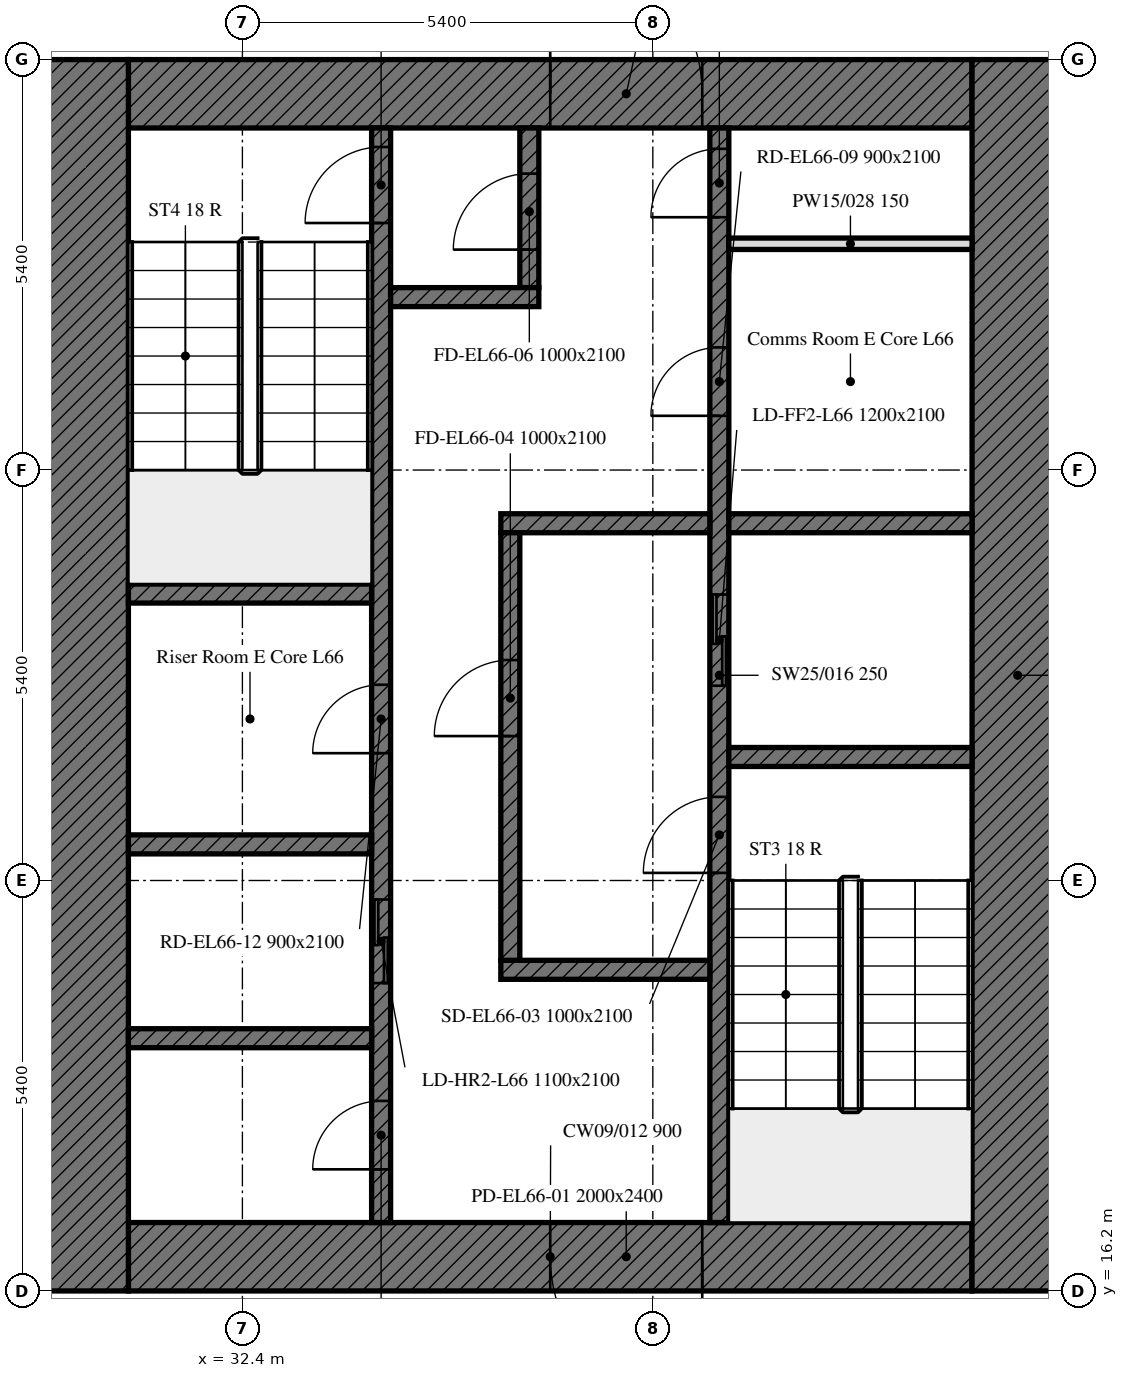
"""IFC4 building model, lengths in metres.
Left out: names, types, materials, properties, quantities, classifications, styles, units other than length and angle.
Written with IfcOpenShell. Run it as: python <this file> out.ifc"""

import sys

from ifc_helpers import new_model, si_unit, direction, frame, frame_2d, origin, place, context, subcontext, project, spatial, rectangle, extrude, element, fill, save


model = new_model("IFC4")
c1 = context("Model", 3, precision=1e-05, world=origin(), true_north=direction((0.0, 1.0)))
c2 = subcontext(c1, "Body", "Model", "MODEL_VIEW")
j1 = project(units=[si_unit("LENGTHUNIT", "METRE"), si_unit("PLANEANGLEUNIT", "RADIAN")], contexts=[c1])
p1 = place(None, origin())
s1 = spatial("IfcSite", under=j1, at=p1, CompositionType="ELEMENT")
p2 = place(p1, origin())
s2 = spatial("IfcBuilding", under=s1, at=p2, CompositionType="ELEMENT")
p3 = place(p2, frame((0.0, 0.0, 271.9)))
s3 = spatial("IfcBuildingStorey", under=s2, at=p3, CompositionType="ELEMENT", Elevation=271.9)
p4 = place(p3, frame((42.0, 16.65, 0.0), z_axis=(0.0, 0.0, 1.0), x_axis=(-1.0, 0.0, 0.0)))
e1 = element("IfcWall", 1, at=p4, inside=s3, PredefinedType="SOLIDWALL", context=c2, shape_type="SweptSolid", body=[
    extrude(rectangle(XDim=11.1, YDim=0.9, at=frame_2d((5.55, 0.0))), origin(), (0.0, 0.0, 1.0), 3.0),
])
p5 = place(p4, frame((3.55, 0.0, 0.0)))
e2 = element("IfcOpeningElement", 2, at=p5, cuts=e1, PredefinedType="OPENING", context=c2, shape_type="SweptSolid", body=[
    extrude(rectangle(XDim=2.0, YDim=2.4, at=frame_2d((1.0, 1.2))), frame((0.0, 0.45, 0.0), z_axis=(0.0, -1.0, 0.0), x_axis=(1.0, 0.0, 0.0)), (0.0, 0.0, 1.0), 0.9),
])
p6 = place(p3, frame((30.9, 31.95, 0.0), z_axis=(0.0, 0.0, 1.0), x_axis=(1.0, 0.0, 0.0)))
e3 = element("IfcWall", 3, at=p6, inside=s3, PredefinedType="SOLIDWALL", context=c2, shape_type="SweptSolid", body=[
    extrude(rectangle(XDim=11.1, YDim=0.9, at=frame_2d((5.55, 0.0))), origin(), (0.0, 0.0, 1.0), 3.0),
])
p7 = place(p6, frame((5.55, 0.0, 0.0)))
e4 = element("IfcOpeningElement", 4, at=p7, cuts=e3, PredefinedType="OPENING", context=c2, shape_type="SweptSolid", body=[
    extrude(rectangle(XDim=2.0, YDim=2.4, at=frame_2d((1.0, 1.2))), frame((0.0, 0.45, 0.0), z_axis=(0.0, -1.0, 0.0), x_axis=(1.0, 0.0, 0.0)), (0.0, 0.0, 1.0), 0.9),
])
for number, where, z_axis, x_axis in (
    (5, (42.6, 32.4, 0.0), (0.0, 0.0, 1.0), (0.0, -1.0, 0.0)),
    (6, (30.3, 16.2, 0.0), (0.0, 0.0, 1.0), (0.0, 1.0, 0.0)),
):
    element("IfcWall", number, at=place(p3, frame(where, z_axis=z_axis, x_axis=x_axis)), inside=s3, PredefinedType="SOLIDWALL", context=c2, shape_type="SweptSolid", body=[
        extrude(rectangle(XDim=16.2, YDim=1.2, at=frame_2d((8.1, 0.0))), origin(), (0.0, 0.0, 1.0), 3.0),
    ])
p8 = place(p3, frame((38.675, 17.1, 0.0), z_axis=(0.0, 0.0, 1.0), x_axis=(0.0, 1.0, 0.0)))
e7 = element("IfcWall", 7, at=p8, inside=s3, PredefinedType="SOLIDWALL", context=c2, shape_type="SweptSolid", body=[
    extrude(rectangle(XDim=14.4, YDim=0.25, at=frame_2d((7.2, 0.0))), origin(), (0.0, 0.0, 1.0), 3.0),
])
p9 = place(p8, frame((4.6, 0.0, 0.0)))
e8 = element("IfcOpeningElement", 8, at=p9, cuts=e7, PredefinedType="OPENING", context=c2, shape_type="SweptSolid", body=[
    extrude(rectangle(XDim=1.0, YDim=2.1, at=frame_2d((0.5, 1.05))), frame((0.0, 0.125, 0.0), z_axis=(0.0, -1.0, 0.0), x_axis=(1.0, 0.0, 0.0)), (0.0, 0.0, 1.0), 0.25),
])
p10 = place(p8, frame((7.062, 0.0, 0.0)))
e9 = element("IfcOpeningElement", 9, at=p10, cuts=e7, PredefinedType="OPENING", context=c2, shape_type="SweptSolid", body=[
    extrude(rectangle(XDim=1.2, YDim=2.1, at=frame_2d((0.6, 1.05))), frame((0.0, 0.125, 0.0), z_axis=(0.0, -1.0, 0.0), x_axis=(1.0, 0.0, 0.0)), (0.0, 0.0, 1.0), 0.25),
])
p11 = place(p8, frame((10.614, 0.0, 0.0)))
e10 = element("IfcOpeningElement", 10, at=p11, cuts=e7, PredefinedType="OPENING", context=c2, shape_type="SweptSolid", body=[
    extrude(rectangle(XDim=0.9, YDim=2.1, at=frame_2d((0.45, 1.05))), frame((0.0, 0.125, 0.0), z_axis=(0.0, -1.0, 0.0), x_axis=(1.0, 0.0, 0.0)), (0.0, 0.0, 1.0), 0.25),
])
p12 = place(p8, frame((13.226, 0.0, 0.0)))
e11 = element("IfcOpeningElement", 11, at=p12, cuts=e7, PredefinedType="OPENING", context=c2, shape_type="SweptSolid", body=[
    extrude(rectangle(XDim=0.9, YDim=2.1, at=frame_2d((0.45, 1.05))), frame((0.0, 0.125, 0.0), z_axis=(0.0, -1.0, 0.0), x_axis=(1.0, 0.0, 0.0)), (0.0, 0.0, 1.0), 0.25),
])
p13 = place(p3, frame((34.225, 17.1, 0.0), z_axis=(0.0, 0.0, 1.0), x_axis=(0.0, 1.0, 0.0)))
e12 = element("IfcWall", 12, at=p13, inside=s3, PredefinedType="SOLIDWALL", context=c2, shape_type="SweptSolid", body=[
    extrude(rectangle(XDim=14.4, YDim=0.25, at=frame_2d((7.2, 0.0))), origin(), (0.0, 0.0, 1.0), 3.0),
])
p14 = place(p13, frame((13.15, 0.0, 0.0)))
e13 = element("IfcOpeningElement", 13, at=p14, cuts=e12, PredefinedType="OPENING", context=c2, shape_type="SweptSolid", body=[
    extrude(rectangle(XDim=1.0, YDim=2.1, at=frame_2d((0.5, 1.05))), frame((0.0, 0.125, 0.0), z_axis=(0.0, -1.0, 0.0), x_axis=(1.0, 0.0, 0.0)), (0.0, 0.0, 1.0), 0.25),
])
p15 = place(p13, frame((3.15, 0.0, 0.0)))
e14 = element("IfcOpeningElement", 14, at=p15, cuts=e12, PredefinedType="OPENING", context=c2, shape_type="SweptSolid", body=[
    extrude(rectangle(XDim=1.1, YDim=2.1, at=frame_2d((0.55, 1.05))), frame((0.0, 0.125, 0.0), z_axis=(0.0, -1.0, 0.0), x_axis=(1.0, 0.0, 0.0)), (0.0, 0.0, 1.0), 0.25),
])
p16 = place(p13, frame((0.7, 0.0, 0.0)))
e15 = element("IfcOpeningElement", 15, at=p16, cuts=e12, PredefinedType="OPENING", context=c2, shape_type="SweptSolid", body=[
    extrude(rectangle(XDim=0.9, YDim=2.1, at=frame_2d((0.45, 1.05))), frame((0.0, 0.125, 0.0), z_axis=(0.0, -1.0, 0.0), x_axis=(1.0, 0.0, 0.0)), (0.0, 0.0, 1.0), 0.25),
])
p17 = place(p13, frame((6.175, 0.0, 0.0)))
e16 = element("IfcOpeningElement", 16, at=p17, cuts=e12, PredefinedType="OPENING", context=c2, shape_type="SweptSolid", body=[
    extrude(rectangle(XDim=0.9, YDim=2.1, at=frame_2d((0.45, 1.05))), frame((0.0, 0.125, 0.0), z_axis=(0.0, -1.0, 0.0), x_axis=(1.0, 0.0, 0.0)), (0.0, 0.0, 1.0), 0.25),
])
p18 = place(p3, frame((38.8, 23.225, 0.0), z_axis=(0.0, 0.0, 1.0), x_axis=(1.0, 0.0, 0.0)))
e17 = element("IfcWall", 17, at=p18, inside=s3, PredefinedType="SOLIDWALL", context=c2, shape_type="SweptSolid", body=[
    extrude(rectangle(XDim=3.2, YDim=0.25, at=frame_2d((1.6, 0.0))), origin(), (0.0, 0.0, 1.0), 3.0),
])
for number, where, z_axis, x_axis in (
    (18, (30.9, 25.375, 0.0), (0.0, 0.0, 1.0), (1.0, 0.0, 0.0)),
    (19, (30.9, 22.075, 0.0), (0.0, 0.0, 1.0), (1.0, 0.0, 0.0)),
):
    element("IfcWall", number, at=place(p3, frame(where, z_axis=z_axis, x_axis=x_axis)), inside=s3, PredefinedType="SOLIDWALL", context=c2, shape_type="SweptSolid", body=[
        extrude(rectangle(XDim=3.2, YDim=0.25, at=frame_2d((1.6, 0.0))), origin(), (0.0, 0.0, 1.0), 3.0),
    ])
p19 = place(p3, frame((38.8, 26.3, 0.0), z_axis=(0.0, 0.0, 1.0), x_axis=(1.0, 0.0, 0.0)))
e20 = element("IfcWall", 20, at=p19, inside=s3, PredefinedType="SOLIDWALL", context=c2, shape_type="SweptSolid", body=[
    extrude(rectangle(XDim=3.2, YDim=0.25, at=frame_2d((1.6, 0.0))), origin(), (0.0, 0.0, 1.0), 3.0),
])
for number, where, z_axis, x_axis in (
    (21, (35.8, 26.3, 0.0), (0.0, 0.0, 1.0), (1.0, 0.0, 0.0)),
    (22, (35.8, 20.425, 0.0), (0.0, 0.0, 1.0), (1.0, 0.0, 0.0)),
):
    element("IfcWall", number, at=place(p3, frame(where, z_axis=z_axis, x_axis=x_axis)), inside=s3, PredefinedType="SOLIDWALL", context=c2, shape_type="SweptSolid", body=[
        extrude(rectangle(XDim=2.75, YDim=0.25, at=frame_2d((1.375, 0.0))), origin(), (0.0, 0.0, 1.0), 3.0),
    ])
p20 = place(p3, frame((36.175, 29.4, 0.0), z_axis=(0.0, 0.0, 1.0), x_axis=(0.0, 1.0, 0.0)))
e23 = element("IfcWall", 23, at=p20, inside=s3, PredefinedType="SOLIDWALL", context=c2, shape_type="SweptSolid", body=[
    extrude(rectangle(XDim=2.1, YDim=0.25, at=frame_2d((1.05, 0.0))), origin(), (0.0, 0.0, 1.0), 3.0),
])
p21 = place(p20, frame((0.5, 0.0, 0.0)))
e24 = element("IfcOpeningElement", 24, at=p21, cuts=e23, PredefinedType="OPENING", context=c2, shape_type="SweptSolid", body=[
    extrude(rectangle(XDim=1.0, YDim=2.1, at=frame_2d((0.5, 1.05))), frame((0.0, 0.125, 0.0), z_axis=(0.0, -1.0, 0.0), x_axis=(1.0, 0.0, 0.0)), (0.0, 0.0, 1.0), 0.25),
])
p22 = place(p3, frame((34.35, 29.275, 0.0), z_axis=(0.0, 0.0, 1.0), x_axis=(1.0, 0.0, 0.0)))
e25 = element("IfcWall", 25, at=p22, inside=s3, PredefinedType="SOLIDWALL", context=c2, shape_type="SweptSolid", body=[
    extrude(rectangle(XDim=1.95, YDim=0.25, at=frame_2d((0.975, 0.0))), origin(), (0.0, 0.0, 1.0), 3.0),
])
p23 = place(p3, frame((35.925, 20.55, 0.0), z_axis=(0.0, 0.0, 1.0), x_axis=(0.0, 1.0, 0.0)))
e26 = element("IfcWall", 26, at=p23, inside=s3, PredefinedType="SOLIDWALL", context=c2, shape_type="SweptSolid", body=[
    extrude(rectangle(XDim=5.625, YDim=0.25, at=frame_2d((2.812, 0.0))), origin(), (0.0, 0.0, 1.0), 3.0),
])
p24 = place(p23, frame((2.95, 0.0, 0.0)))
e27 = element("IfcOpeningElement", 27, at=p24, cuts=e26, PredefinedType="OPENING", context=c2, shape_type="SweptSolid", body=[
    extrude(rectangle(XDim=1.0, YDim=2.1, at=frame_2d((0.5, 1.05))), frame((0.0, 0.125, 0.0), z_axis=(0.0, -1.0, 0.0), x_axis=(1.0, 0.0, 0.0)), (0.0, 0.0, 1.0), 0.25),
])
p25 = place(p3, frame((30.9, 19.525, 0.0), z_axis=(0.0, 0.0, 1.0), x_axis=(1.0, 0.0, 0.0)))
e28 = element("IfcWall", 28, at=p25, inside=s3, PredefinedType="SOLIDWALL", context=c2, shape_type="SweptSolid", body=[
    extrude(rectangle(XDim=3.2, YDim=0.25, at=frame_2d((1.6, 0.0))), origin(), (0.0, 0.0, 1.0), 3.0),
])
p26 = place(p3, frame((38.8, 29.977, 0.0), z_axis=(0.0, 0.0, 1.0), x_axis=(1.0, 0.0, 0.0)))
e29 = element("IfcWall", 29, at=p26, inside=s3, PredefinedType="PARTITIONING", context=c2, shape_type="SweptSolid", body=[
    extrude(rectangle(XDim=3.2, YDim=0.15, at=frame_2d((1.6, 0.0))), origin(), (0.0, 0.0, 1.0), 3.0),
])
p27 = place(p5, origin())
e30 = element("IfcDoor", 30, at=p27, inside=s3, OperationType="DOUBLE_DOOR_SINGLE_SWING", PredefinedType="DOOR", context=c2, shape_type="SweptSolid", body=[
    extrude(rectangle(XDim=2.0, YDim=2.4, at=frame_2d((1.0, 1.2))), frame((0.0, 0.025, 0.0), z_axis=(0.0, -1.0, 0.0), x_axis=(1.0, 0.0, 0.0)), (0.0, 0.0, 1.0), 0.05),
])
fill(e2, e30)
p28 = place(p7, origin())
e31 = element("IfcDoor", 31, at=p28, inside=s3, OperationType="DOUBLE_DOOR_SINGLE_SWING", PredefinedType="DOOR", context=c2, shape_type="SweptSolid", body=[
    extrude(rectangle(XDim=2.0, YDim=2.4, at=frame_2d((1.0, 1.2))), frame((0.0, 0.025, 0.0), z_axis=(0.0, -1.0, 0.0), x_axis=(1.0, 0.0, 0.0)), (0.0, 0.0, 1.0), 0.05),
])
fill(e4, e31)
p29 = place(p9, origin())
e32 = element("IfcDoor", 32, at=p29, inside=s3, OperationType="SINGLE_SWING_LEFT", PredefinedType="DOOR", context=c2, shape_type="SweptSolid", body=[
    extrude(rectangle(XDim=1.0, YDim=2.1, at=frame_2d((0.5, 1.05))), frame((0.0, 0.025, 0.0), z_axis=(0.0, -1.0, 0.0), x_axis=(1.0, 0.0, 0.0)), (0.0, 0.0, 1.0), 0.05),
])
fill(e8, e32)
p30 = place(p24, origin())
e33 = element("IfcDoor", 33, at=p30, inside=s3, OperationType="SINGLE_SWING_LEFT", PredefinedType="DOOR", context=c2, shape_type="SweptSolid", body=[
    extrude(rectangle(XDim=1.0, YDim=2.1, at=frame_2d((0.5, 1.05))), frame((0.0, 0.025, 0.0), z_axis=(0.0, -1.0, 0.0), x_axis=(1.0, 0.0, 0.0)), (0.0, 0.0, 1.0), 0.05),
])
fill(e27, e33)
p31 = place(p14, origin())
e34 = element("IfcDoor", 34, at=p31, inside=s3, OperationType="SINGLE_SWING_LEFT", PredefinedType="DOOR", context=c2, shape_type="SweptSolid", body=[
    extrude(rectangle(XDim=1.0, YDim=2.1, at=frame_2d((0.5, 1.05))), frame((0.0, 0.025, 0.0), z_axis=(0.0, -1.0, 0.0), x_axis=(1.0, 0.0, 0.0)), (0.0, 0.0, 1.0), 0.05),
])
fill(e13, e34)
p32 = place(p21, origin())
e35 = element("IfcDoor", 35, at=p32, inside=s3, OperationType="SINGLE_SWING_LEFT", PredefinedType="DOOR", context=c2, shape_type="SweptSolid", body=[
    extrude(rectangle(XDim=1.0, YDim=2.1, at=frame_2d((0.5, 1.05))), frame((0.0, 0.025, 0.0), z_axis=(0.0, -1.0, 0.0), x_axis=(1.0, 0.0, 0.0)), (0.0, 0.0, 1.0), 0.05),
])
fill(e24, e35)
p33 = place(p10, origin())
e36 = element("IfcDoor", 36, at=p33, inside=s3, OperationType="DOUBLE_DOOR_SLIDING", PredefinedType="DOOR", context=c2, shape_type="SweptSolid", body=[
    extrude(rectangle(XDim=1.2, YDim=2.1, at=frame_2d((0.6, 1.05))), frame((0.0, 0.025, 0.0), z_axis=(0.0, -1.0, 0.0), x_axis=(1.0, 0.0, 0.0)), (0.0, 0.0, 1.0), 0.05),
])
fill(e9, e36)
p34 = place(p15, origin())
e37 = element("IfcDoor", 37, at=p34, inside=s3, OperationType="DOUBLE_DOOR_SLIDING", PredefinedType="DOOR", context=c2, shape_type="SweptSolid", body=[
    extrude(rectangle(XDim=1.1, YDim=2.1, at=frame_2d((0.55, 1.05))), frame((0.0, 0.025, 0.0), z_axis=(0.0, -1.0, 0.0), x_axis=(1.0, 0.0, 0.0)), (0.0, 0.0, 1.0), 0.05),
])
fill(e14, e37)
p35 = place(p11, origin())
e38 = element("IfcDoor", 38, at=p35, inside=s3, OperationType="SINGLE_SWING_LEFT", PredefinedType="DOOR", context=c2, shape_type="SweptSolid", body=[
    extrude(rectangle(XDim=0.9, YDim=2.1, at=frame_2d((0.45, 1.05))), frame((0.0, 0.025, 0.0), z_axis=(0.0, -1.0, 0.0), x_axis=(1.0, 0.0, 0.0)), (0.0, 0.0, 1.0), 0.05),
])
fill(e10, e38)
p36 = place(p12, origin())
e39 = element("IfcDoor", 39, at=p36, inside=s3, OperationType="SINGLE_SWING_LEFT", PredefinedType="DOOR", context=c2, shape_type="SweptSolid", body=[
    extrude(rectangle(XDim=0.9, YDim=2.1, at=frame_2d((0.45, 1.05))), frame((0.0, 0.025, 0.0), z_axis=(0.0, -1.0, 0.0), x_axis=(1.0, 0.0, 0.0)), (0.0, 0.0, 1.0), 0.05),
])
fill(e11, e39)
p37 = place(p16, origin())
e40 = element("IfcDoor", 40, at=p37, inside=s3, OperationType="SINGLE_SWING_LEFT", PredefinedType="DOOR", context=c2, shape_type="SweptSolid", body=[
    extrude(rectangle(XDim=0.9, YDim=2.1, at=frame_2d((0.45, 1.05))), frame((0.0, 0.025, 0.0), z_axis=(0.0, -1.0, 0.0), x_axis=(1.0, 0.0, 0.0)), (0.0, 0.0, 1.0), 0.05),
])
fill(e15, e40)
p38 = place(p17, origin())
e41 = element("IfcDoor", 41, at=p38, inside=s3, OperationType="SINGLE_SWING_LEFT", PredefinedType="DOOR", context=c2, shape_type="SweptSolid", body=[
    extrude(rectangle(XDim=0.9, YDim=2.1, at=frame_2d((0.45, 1.05))), frame((0.0, 0.025, 0.0), z_axis=(0.0, -1.0, 0.0), x_axis=(1.0, 0.0, 0.0)), (0.0, 0.0, 1.0), 0.05),
])
fill(e16, e41)
save(model, sys.argv[1])
